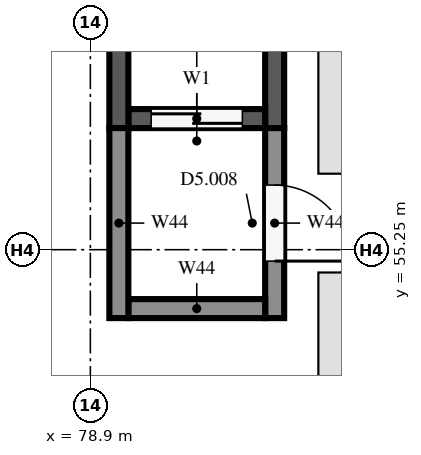
"""IFC4 building model, lengths in metres.
Left out: names, types, materials, properties, quantities, classifications, styles, units other than length and angle.
Written with IfcOpenShell. Run it as: python <this file> out.ifc"""

import sys

from ifc_helpers import new_model, si_unit, direction, frame, frame_2d, origin, place, context, subcontext, project, spatial, rectangle, extrude, element, fill, save


model = new_model("IFC4")
c1 = context("Model", 3, precision=1e-05, world=origin(), true_north=direction((0.0, 1.0)))
c2 = subcontext(c1, "Body", "Model", "MODEL_VIEW")
j1 = project(units=[si_unit("LENGTHUNIT", "METRE"), si_unit("PLANEANGLEUNIT", "RADIAN")], contexts=[c1])
p1 = place(None, origin())
s1 = spatial("IfcSite", under=j1, at=p1, CompositionType="ELEMENT")
p2 = place(p1, origin())
s2 = spatial("IfcBuilding", under=s1, at=p2, CompositionType="ELEMENT")
p3 = place(p2, frame((0.0, 0.0, 18.9)))
s3 = spatial("IfcBuildingStorey", under=s2, at=p3, CompositionType="ELEMENT", Elevation=18.9)
for number, where, z_axis, x_axis in (
    (1, (79.275, 56.85, 0.0), (0.0, 0.0, 1.0), (0.0, 1.0, 0.0)),
    (2, (81.325, 56.85, 0.0), (0.0, 0.0, 1.0), (0.0, 1.0, 0.0)),
):
    element("IfcWall", number, at=place(p3, frame(where, z_axis=z_axis, x_axis=x_axis)), inside=s3, PredefinedType="SHEAR", context=c2, shape_type="SweptSolid", body=[
        extrude(rectangle(XDim=2.9, YDim=0.25, at=frame_2d((1.45, 0.0))), origin(), (0.0, 0.0, 1.0), 4.2),
    ])
p4 = place(p3, frame((79.4, 56.975, 0.0), z_axis=(0.0, 0.0, 1.0), x_axis=(1.0, 0.0, 0.0)))
e3 = element("IfcWall", 3, at=p4, inside=s3, PredefinedType="SHEAR", context=c2, shape_type="SweptSolid", body=[
    extrude(rectangle(XDim=1.8, YDim=0.25, at=frame_2d((0.9, 0.0))), origin(), (0.0, 0.0, 1.0), 4.2),
])
p5 = place(p4, frame((0.3, 0.0, 0.0)))
e4 = element("IfcOpeningElement", 4, at=p5, cuts=e3, PredefinedType="OPENING", context=c2, shape_type="SweptSolid", body=[
    extrude(rectangle(XDim=1.2, YDim=2.1, at=frame_2d((0.6, 1.05))), frame((0.0, 0.135, 0.0), z_axis=(0.0, -1.0, 0.0), x_axis=(1.0, 0.0, 0.0)), (0.0, 0.0, 1.0), 0.27),
])
p6 = place(p3, frame((79.275, 54.35, 0.0), z_axis=(0.0, 0.0, 1.0), x_axis=(0.0, 1.0, 0.0)))
e5 = element("IfcWall", 5, at=p6, inside=s3, PredefinedType="SOLIDWALL", context=c2, shape_type="SweptSolid", body=[
    extrude(rectangle(XDim=2.5, YDim=0.25, at=frame_2d((1.25, 0.0))), origin(), (0.0, 0.0, 1.0), 4.2),
])
p7 = place(p3, frame((81.325, 56.85, 0.0), z_axis=(0.0, 0.0, 1.0), x_axis=(0.0, -1.0, 0.0)))
e6 = element("IfcWall", 6, at=p7, inside=s3, PredefinedType="SOLIDWALL", context=c2, shape_type="SweptSolid", body=[
    extrude(rectangle(XDim=2.5, YDim=0.25, at=frame_2d((1.25, 0.0))), origin(), (0.0, 0.0, 1.0), 4.2),
])
p8 = place(p7, frame((0.75, 0.0, 0.0)))
e7 = element("IfcOpeningElement", 7, at=p8, cuts=e6, PredefinedType="OPENING", context=c2, shape_type="SweptSolid", body=[
    extrude(rectangle(XDim=1.0, YDim=2.1, at=frame_2d((0.5, 1.05))), frame((0.0, 0.135, 0.0), z_axis=(0.0, -1.0, 0.0), x_axis=(1.0, 0.0, 0.0)), (0.0, 0.0, 1.0), 0.27),
])
p9 = place(p3, frame((79.4, 54.475, 0.0), z_axis=(0.0, 0.0, 1.0), x_axis=(1.0, 0.0, 0.0)))
e8 = element("IfcWall", 8, at=p9, inside=s3, PredefinedType="SOLIDWALL", context=c2, shape_type="SweptSolid", body=[
    extrude(rectangle(XDim=1.8, YDim=0.25, at=frame_2d((0.9, 0.0))), origin(), (0.0, 0.0, 1.0), 4.2),
])
p10 = place(p8, origin())
e9 = element("IfcDoor", 9, at=p10, inside=s3, OperationType="SINGLE_SWING_RIGHT", PredefinedType="DOOR", context=c2, shape_type="SweptSolid", body=[
    extrude(rectangle(XDim=1.0, YDim=2.1, at=frame_2d((0.5, 1.05))), frame((0.0, 0.025, 0.0), z_axis=(0.0, -1.0, 0.0), x_axis=(1.0, 0.0, 0.0)), (0.0, 0.0, 1.0), 0.05),
])
fill(e7, e9)
p11 = place(p5, origin())
e10 = element("IfcDoor", 10, at=p11, inside=s3, OperationType="SLIDING_TO_LEFT", PredefinedType="DOOR", context=c2, shape_type="SweptSolid", body=[
    extrude(rectangle(XDim=1.2, YDim=2.1, at=frame_2d((0.6, 1.05))), frame((0.0, 0.025, 0.0), z_axis=(0.0, -1.0, 0.0), x_axis=(1.0, 0.0, 0.0)), (0.0, 0.0, 1.0), 0.05),
])
fill(e4, e10)
save(model, sys.argv[1])
